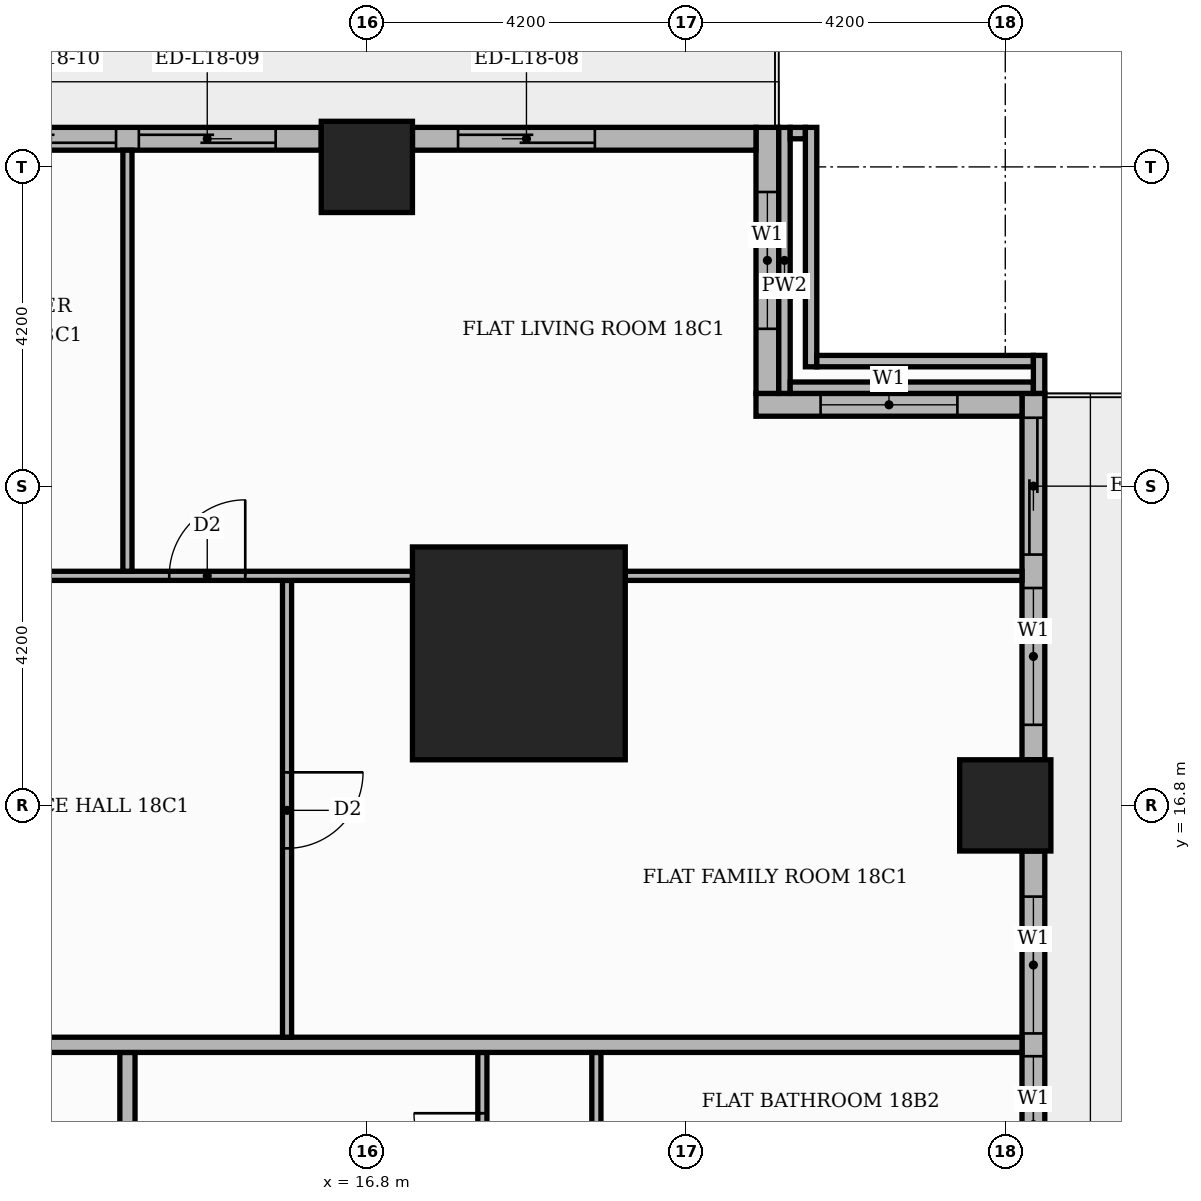
"""IFC4 building model, lengths in metres.
Left out: names, types, materials, properties, quantities, classifications, styles, units other than length and angle.
Written with IfcOpenShell. Run it as: python <this file> out.ifc"""

import sys

from ifc_helpers import new_model, si_unit, direction, frame, frame_2d, origin, origin_2d, place, context, subcontext, project, spatial, rectangle, extrude, element, fill, save


model = new_model("IFC4")
c1 = context("Model", 3, precision=1e-05, world=origin(), true_north=direction((0.0, 1.0)))
c2 = subcontext(c1, "Body", "Model", "MODEL_VIEW")
j1 = project(units=[si_unit("LENGTHUNIT", "METRE"), si_unit("PLANEANGLEUNIT", "RADIAN")], contexts=[c1])
p1 = place(None, origin())
s1 = spatial("IfcSite", under=j1, at=p1, CompositionType="ELEMENT")
p2 = place(p1, origin())
s2 = spatial("IfcBuilding", under=s1, at=p2, CompositionType="ELEMENT")
p3 = place(p2, frame((0.0, 0.0, 79.2)))
s3 = spatial("IfcBuildingStorey", under=s2, at=p3, CompositionType="ELEMENT", Elevation=79.2)
p4 = place(p3, frame((18.8, 18.8, 0.0), z_axis=(0.0, 0.0, 1.0), x_axis=(1.0, 0.0, 0.0)))
e1 = element("IfcColumn", 1, at=p4, inside=s3, PredefinedType="COLUMN", context=c2, shape_type="SweptSolid", body=[
    extrude(rectangle(XDim=2.8, YDim=2.8, at=origin_2d()), origin(), (0.0, 0.0, 1.0), 3.9),
])
for number, where, z_axis, x_axis in (
    (2, (25.2, 16.8, 0.0), (0.0, 0.0, 1.0), (1.0, 0.0, 0.0)),
    (3, (16.8, 25.2, 0.0), (0.0, 0.0, 1.0), (1.0, 0.0, 0.0)),
):
    element("IfcColumn", number, at=place(p3, frame(where, z_axis=z_axis, x_axis=x_axis)), inside=s3, PredefinedType="COLUMN", context=c2, shape_type="SweptSolid", body=[
        extrude(rectangle(XDim=1.2, YDim=1.2, at=origin_2d()), origin(), (0.0, 0.0, 1.0), 3.9),
    ])
p5 = place(p3, frame((25.57, 9.0, 0.0), z_axis=(0.0, 0.0, 1.0), x_axis=(0.0, 1.0, 0.0)))
e4 = element("IfcWall", 4, at=p5, inside=s3, PredefinedType="STANDARD", context=c2, shape_type="SweptSolid", body=[
    extrude(rectangle(XDim=7.2, YDim=0.3, at=frame_2d((3.6, 0.0))), origin(), (0.0, 0.0, 1.0), 3.48),
])
p6 = place(p5, frame((0.6, 0.0, 0.9)))
e5 = element("IfcOpeningElement", 5, at=p6, cuts=e4, PredefinedType="OPENING", context=c2, shape_type="SweptSolid", body=[
    extrude(rectangle(XDim=1.8, YDim=2.1, at=frame_2d((0.9, 1.05))), frame((0.0, 0.16, 0.0), z_axis=(0.0, -1.0, 0.0), x_axis=(1.0, 0.0, 0.0)), (0.0, 0.0, 1.0), 0.32),
])
p7 = place(p5, frame((2.7, 0.0, 0.9)))
e6 = element("IfcOpeningElement", 6, at=p7, cuts=e4, PredefinedType="OPENING", context=c2, shape_type="SweptSolid", body=[
    extrude(rectangle(XDim=1.8, YDim=2.1, at=frame_2d((0.9, 1.05))), frame((0.0, 0.16, 0.0), z_axis=(0.0, -1.0, 0.0), x_axis=(1.0, 0.0, 0.0)), (0.0, 0.0, 1.0), 0.32),
])
p8 = place(p5, frame((4.8, 0.0, 0.9)))
e7 = element("IfcOpeningElement", 7, at=p8, cuts=e4, PredefinedType="OPENING", context=c2, shape_type="SweptSolid", body=[
    extrude(rectangle(XDim=1.8, YDim=2.1, at=frame_2d((0.9, 1.05))), frame((0.0, 0.16, 0.0), z_axis=(0.0, -1.0, 0.0), x_axis=(1.0, 0.0, 0.0)), (0.0, 0.0, 1.0), 0.32),
])
p9 = place(p3, frame((25.57, 17.4, 0.0), z_axis=(0.0, 0.0, 1.0), x_axis=(0.0, 1.0, 0.0)))
e8 = element("IfcWall", 8, at=p9, inside=s3, PredefinedType="STANDARD", context=c2, shape_type="SweptSolid", body=[
    extrude(rectangle(XDim=4.82, YDim=0.3, at=frame_2d((2.41, 0.0))), origin(), (0.0, 0.0, 1.0), 3.48),
])
p10 = place(p9, frame((2.7, 0.0, 0.0)))
e9 = element("IfcOpeningElement", 9, at=p10, cuts=e8, PredefinedType="OPENING", context=c2, shape_type="SweptSolid", body=[
    extrude(rectangle(XDim=1.8, YDim=2.4, at=frame_2d((0.9, 1.2))), frame((0.0, 0.16, 0.0), z_axis=(0.0, -1.0, 0.0), x_axis=(1.0, 0.0, 0.0)), (0.0, 0.0, 1.0), 0.32),
])
p11 = place(p9, frame((0.46, 0.0, 0.9)))
e10 = element("IfcOpeningElement", 10, at=p11, cuts=e8, PredefinedType="OPENING", context=c2, shape_type="SweptSolid", body=[
    extrude(rectangle(XDim=1.8, YDim=2.1, at=frame_2d((0.9, 1.05))), frame((0.0, 0.16, 0.0), z_axis=(0.0, -1.0, 0.0), x_axis=(1.0, 0.0, 0.0)), (0.0, 0.0, 1.0), 0.32),
])
p12 = place(p3, frame((25.42, 22.07, 0.0), z_axis=(0.0, 0.0, 1.0), x_axis=(-1.0, 0.0, 0.0)))
e11 = element("IfcWall", 11, at=p12, inside=s3, PredefinedType="STANDARD", context=c2, shape_type="SweptSolid", body=[
    extrude(rectangle(XDim=3.5, YDim=0.3, at=frame_2d((1.75, 0.0))), origin(), (0.0, 0.0, 1.0), 3.48),
])
p13 = place(p12, frame((0.85, 0.0, 0.9)))
e12 = element("IfcOpeningElement", 12, at=p13, cuts=e11, PredefinedType="OPENING", context=c2, shape_type="SweptSolid", body=[
    extrude(rectangle(XDim=1.8, YDim=2.1, at=frame_2d((0.9, 1.05))), frame((0.0, 0.16, 0.0), z_axis=(0.0, -1.0, 0.0), x_axis=(1.0, 0.0, 0.0)), (0.0, 0.0, 1.0), 0.32),
])
p14 = place(p3, frame((22.07, 22.22, 0.0), z_axis=(0.0, 0.0, 1.0), x_axis=(0.0, 1.0, 0.0)))
e13 = element("IfcWall", 13, at=p14, inside=s3, PredefinedType="STANDARD", context=c2, shape_type="SweptSolid", body=[
    extrude(rectangle(XDim=3.5, YDim=0.3, at=frame_2d((1.75, 0.0))), origin(), (0.0, 0.0, 1.0), 3.48),
])
p15 = place(p14, frame((0.85, 0.0, 0.9)))
e14 = element("IfcOpeningElement", 14, at=p15, cuts=e13, PredefinedType="OPENING", context=c2, shape_type="SweptSolid", body=[
    extrude(rectangle(XDim=1.8, YDim=2.1, at=frame_2d((0.9, 1.05))), frame((0.0, 0.16, 0.0), z_axis=(0.0, -1.0, 0.0), x_axis=(1.0, 0.0, 0.0)), (0.0, 0.0, 1.0), 0.32),
])
p16 = place(p3, frame((21.92, 25.57, 0.0), z_axis=(0.0, 0.0, 1.0), x_axis=(-1.0, 0.0, 0.0)))
e15 = element("IfcWall", 15, at=p16, inside=s3, PredefinedType="STANDARD", context=c2, shape_type="SweptSolid", body=[
    extrude(rectangle(XDim=4.52, YDim=0.3, at=frame_2d((2.26, 0.0))), origin(), (0.0, 0.0, 1.0), 3.48),
])
p17 = place(p16, frame((2.12, 0.0, 0.0)))
e16 = element("IfcOpeningElement", 16, at=p17, cuts=e15, PredefinedType="OPENING", context=c2, shape_type="SweptSolid", body=[
    extrude(rectangle(XDim=1.8, YDim=2.4, at=frame_2d((0.9, 1.2))), frame((0.0, 0.16, 0.0), z_axis=(0.0, -1.0, 0.0), x_axis=(1.0, 0.0, 0.0)), (0.0, 0.0, 1.0), 0.32),
])
p18 = place(p3, frame((16.2, 25.57, 0.0), z_axis=(0.0, 0.0, 1.0), x_axis=(-1.0, 0.0, 0.0)))
e17 = element("IfcWall", 17, at=p18, inside=s3, PredefinedType="STANDARD", context=c2, shape_type="SweptSolid", body=[
    extrude(rectangle(XDim=7.2, YDim=0.3, at=frame_2d((3.6, 0.0))), origin(), (0.0, 0.0, 1.0), 3.48),
])
p19 = place(p18, frame((0.6, 0.0, 0.0)))
e18 = element("IfcOpeningElement", 18, at=p19, cuts=e17, PredefinedType="OPENING", context=c2, shape_type="SweptSolid", body=[
    extrude(rectangle(XDim=1.8, YDim=2.4, at=frame_2d((0.9, 1.2))), frame((0.0, 0.16, 0.0), z_axis=(0.0, -1.0, 0.0), x_axis=(1.0, 0.0, 0.0)), (0.0, 0.0, 1.0), 0.32),
])
p20 = place(p18, frame((2.7, 0.0, 0.0)))
e19 = element("IfcOpeningElement", 19, at=p20, cuts=e17, PredefinedType="OPENING", context=c2, shape_type="SweptSolid", body=[
    extrude(rectangle(XDim=1.8, YDim=2.4, at=frame_2d((0.9, 1.2))), frame((0.0, 0.16, 0.0), z_axis=(0.0, -1.0, 0.0), x_axis=(1.0, 0.0, 0.0)), (0.0, 0.0, 1.0), 0.32),
])
p21 = place(p18, frame((4.8, 0.0, 0.9)))
e20 = element("IfcOpeningElement", 20, at=p21, cuts=e17, PredefinedType="OPENING", context=c2, shape_type="SweptSolid", body=[
    extrude(rectangle(XDim=1.8, YDim=2.1, at=frame_2d((0.9, 1.05))), frame((0.0, 0.16, 0.0), z_axis=(0.0, -1.0, 0.0), x_axis=(1.0, 0.0, 0.0)), (0.0, 0.0, 1.0), 0.32),
])
p22 = place(p3, frame((22.295, 22.22, 0.0), z_axis=(0.0, 0.0, 1.0), x_axis=(0.0, 1.0, 0.0)))
e21 = element("IfcWall", 21, at=p22, inside=s3, PredefinedType="PARAPET", context=c2, shape_type="SweptSolid", body=[
    extrude(rectangle(XDim=3.5, YDim=0.15, at=frame_2d((1.75, 0.0))), origin(), (0.0, 0.0, 1.0), 1.1),
])
p23 = place(p3, frame((22.37, 25.645, 0.0), z_axis=(0.0, 0.0, 1.0), x_axis=(1.0, 0.0, 0.0)))
e22 = element("IfcWall", 22, at=p23, inside=s3, PredefinedType="PARAPET", context=c2, shape_type="SweptSolid", body=[
    extrude(rectangle(XDim=0.2, YDim=0.15, at=frame_2d((0.1, 0.0))), origin(), (0.0, 0.0, 1.0), 1.1),
])
p24 = place(p3, frame((22.37, 22.295, 0.0), z_axis=(0.0, 0.0, 1.0), x_axis=(1.0, 0.0, 0.0)))
e23 = element("IfcWall", 23, at=p24, inside=s3, PredefinedType="PARAPET", context=c2, shape_type="SweptSolid", body=[
    extrude(rectangle(XDim=3.2, YDim=0.15, at=frame_2d((1.6, 0.0))), origin(), (0.0, 0.0, 1.0), 1.1),
])
p25 = place(p3, frame((22.645, 22.57, 0.0), z_axis=(0.0, 0.0, 1.0), x_axis=(0.0, 1.0, 0.0)))
e24 = element("IfcWall", 24, at=p25, inside=s3, PredefinedType="PARAPET", context=c2, shape_type="SweptSolid", body=[
    extrude(rectangle(XDim=3.15, YDim=0.15, at=frame_2d((1.575, 0.0))), origin(), (0.0, 0.0, 1.0), 1.1),
])
p26 = place(p3, frame((22.72, 22.645, 0.0), z_axis=(0.0, 0.0, 1.0), x_axis=(1.0, 0.0, 0.0)))
e25 = element("IfcWall", 25, at=p26, inside=s3, PredefinedType="PARAPET", context=c2, shape_type="SweptSolid", body=[
    extrude(rectangle(XDim=2.85, YDim=0.15, at=frame_2d((1.425, 0.0))), origin(), (0.0, 0.0, 1.0), 1.1),
])
p27 = place(p3, frame((25.645, 22.22, 0.0), z_axis=(0.0, 0.0, 1.0), x_axis=(0.0, 1.0, 0.0)))
e26 = element("IfcWall", 26, at=p27, inside=s3, PredefinedType="PARAPET", context=c2, shape_type="SweptSolid", body=[
    extrude(rectangle(XDim=0.5, YDim=0.15, at=frame_2d((0.25, 0.0))), origin(), (0.0, 0.0, 1.0), 1.1),
])
p28 = place(p3, frame((13.65, -5.15, 0.0), z_axis=(0.0, 0.0, 1.0), x_axis=(0.0, 1.0, 0.0)))
e27 = element("IfcWall", 27, at=p28, inside=s3, PredefinedType="PARTITIONING", context=c2, shape_type="SweptSolid", body=[
    extrude(rectangle(XDim=18.7, YDim=0.2, at=frame_2d((9.35, 0.0))), origin(), (0.0, 0.0, 1.0), 3.48),
])
p29 = place(p28, frame((5.65, 0.0, 0.0)))
e28 = element("IfcOpeningElement", 28, at=p29, cuts=e27, PredefinedType="OPENING", context=c2, shape_type="SweptSolid", body=[
    extrude(rectangle(XDim=1.1, YDim=2.4, at=frame_2d((0.55, 1.2))), frame((0.0, 0.11, 0.0), z_axis=(0.0, -1.0, 0.0), x_axis=(1.0, 0.0, 0.0)), (0.0, 0.0, 1.0), 0.22),
])
p30 = place(p3, frame((18.32, 11.01, 0.0), z_axis=(0.0, 0.0, 1.0), x_axis=(0.0, 1.0, 0.0)))
e29 = element("IfcWall", 29, at=p30, inside=s3, PredefinedType="PARTITIONING", context=c2, shape_type="SweptSolid", body=[
    extrude(rectangle(XDim=2.54, YDim=0.12, at=frame_2d((1.27, 0.0))), origin(), (0.0, 0.0, 1.0), 3.48),
])
p31 = place(p30, frame((0.84, 0.0, 0.0)))
e30 = element("IfcOpeningElement", 30, at=p31, cuts=e29, PredefinedType="OPENING", context=c2, shape_type="SweptSolid", body=[
    extrude(rectangle(XDim=0.9, YDim=2.1, at=frame_2d((0.45, 1.05))), frame((0.0, 0.07, 0.0), z_axis=(0.0, -1.0, 0.0), x_axis=(1.0, 0.0, 0.0)), (0.0, 0.0, 1.0), 0.14),
])
p32 = place(p3, frame((19.82, 11.61, 0.0), z_axis=(0.0, 0.0, 1.0), x_axis=(0.0, 1.0, 0.0)))
e31 = element("IfcWall", 31, at=p32, inside=s3, PredefinedType="PARTITIONING", context=c2, shape_type="SweptSolid", body=[
    extrude(rectangle(XDim=1.94, YDim=0.12, at=frame_2d((0.97, 0.0))), origin(), (0.0, 0.0, 1.0), 3.48),
])
p33 = place(p3, frame((-13.65, 13.65, 0.0), z_axis=(0.0, 0.0, 1.0), x_axis=(1.0, 0.0, 0.0)))
e32 = element("IfcWall", 32, at=p33, inside=s3, PredefinedType="PARTITIONING", context=c2, shape_type="SweptSolid", body=[
    extrude(rectangle(XDim=39.07, YDim=0.2, at=frame_2d((19.535, 0.0))), origin(), (0.0, 0.0, 1.0), 3.48),
])
p34 = place(p33, frame((24.65, 0.0, 0.0)))
e33 = element("IfcOpeningElement", 33, at=p34, cuts=e32, PredefinedType="OPENING", context=c2, shape_type="SweptSolid", body=[
    extrude(rectangle(XDim=1.1, YDim=2.4, at=frame_2d((0.55, 1.2))), frame((0.0, 0.11, 0.0), z_axis=(0.0, -1.0, 0.0), x_axis=(1.0, 0.0, 0.0)), (0.0, 0.0, 1.0), 0.22),
])
p35 = place(p33, frame((14.15, 0.0, 0.0)))
e34 = element("IfcOpeningElement", 34, at=p35, cuts=e32, PredefinedType="OPENING", context=c2, shape_type="SweptSolid", body=[
    extrude(rectangle(XDim=1.1, YDim=2.4, at=frame_2d((0.55, 1.2))), frame((0.0, 0.11, 0.0), z_axis=(0.0, -1.0, 0.0), x_axis=(1.0, 0.0, 0.0)), (0.0, 0.0, 1.0), 0.22),
])
p36 = place(p3, frame((15.75, 13.75, 0.0), z_axis=(0.0, 0.0, 1.0), x_axis=(0.0, 1.0, 0.0)))
e35 = element("IfcWall", 35, at=p36, inside=s3, PredefinedType="PARTITIONING", context=c2, shape_type="SweptSolid", body=[
    extrude(rectangle(XDim=6.01, YDim=0.12, at=frame_2d((3.005, 0.0))), origin(), (0.0, 0.0, 1.0), 3.48),
])
p37 = place(p36, frame((2.485, 0.0, 0.0)))
e36 = element("IfcOpeningElement", 36, at=p37, cuts=e35, PredefinedType="OPENING", context=c2, shape_type="SweptSolid", body=[
    extrude(rectangle(XDim=1.0, YDim=2.1, at=frame_2d((0.5, 1.05))), frame((0.0, 0.07, 0.0), z_axis=(0.0, -1.0, 0.0), x_axis=(1.0, 0.0, 0.0)), (0.0, 0.0, 1.0), 0.14),
])
p38 = place(p3, frame((5.35, 19.82, 0.0), z_axis=(0.0, 0.0, 1.0), x_axis=(1.0, 0.0, 0.0)))
e37 = element("IfcWall", 37, at=p38, inside=s3, PredefinedType="PARTITIONING", context=c2, shape_type="SweptSolid", body=[
    extrude(rectangle(XDim=12.05, YDim=0.12, at=frame_2d((6.025, 0.0))), origin(), (0.0, 0.0, 1.0), 3.48),
])
p39 = place(p38, frame((8.85, 0.0, 0.0)))
e38 = element("IfcOpeningElement", 38, at=p39, cuts=e37, PredefinedType="OPENING", context=c2, shape_type="SweptSolid", body=[
    extrude(rectangle(XDim=1.0, YDim=2.1, at=frame_2d((0.5, 1.05))), frame((0.0, 0.07, 0.0), z_axis=(0.0, -1.0, 0.0), x_axis=(1.0, 0.0, 0.0)), (0.0, 0.0, 1.0), 0.14),
])
p40 = place(p38, frame((5.75, 0.0, 0.0)))
e39 = element("IfcOpeningElement", 39, at=p40, cuts=e37, PredefinedType="OPENING", context=c2, shape_type="SweptSolid", body=[
    extrude(rectangle(XDim=0.9, YDim=2.1, at=frame_2d((0.45, 1.05))), frame((0.0, 0.07, 0.0), z_axis=(0.0, -1.0, 0.0), x_axis=(1.0, 0.0, 0.0)), (0.0, 0.0, 1.0), 0.14),
])
p41 = place(p3, frame((20.2, 19.82, 0.0), z_axis=(0.0, 0.0, 1.0), x_axis=(1.0, 0.0, 0.0)))
e40 = element("IfcWall", 40, at=p41, inside=s3, PredefinedType="PARTITIONING", context=c2, shape_type="SweptSolid", body=[
    extrude(rectangle(XDim=5.22, YDim=0.12, at=frame_2d((2.61, 0.0))), origin(), (0.0, 0.0, 1.0), 3.48),
])
p42 = place(p3, frame((13.65, 19.88, 0.0), z_axis=(0.0, 0.0, 1.0), x_axis=(0.0, 1.0, 0.0)))
e41 = element("IfcWall", 41, at=p42, inside=s3, PredefinedType="PARTITIONING", context=c2, shape_type="SweptSolid", body=[
    extrude(rectangle(XDim=5.54, YDim=0.12, at=frame_2d((2.77, 0.0))), origin(), (0.0, 0.0, 1.0), 3.48),
])
p43 = place(p7, origin())
e42 = element("IfcWindow", 42, at=p43, inside=s3, PartitioningType="SINGLE_PANEL", PredefinedType="WINDOW", context=c2, shape_type="SweptSolid", body=[
    extrude(rectangle(XDim=1.8, YDim=2.1, at=frame_2d((0.9, 1.05))), frame((0.0, 0.03, 0.0), z_axis=(0.0, -1.0, 0.0), x_axis=(1.0, 0.0, 0.0)), (0.0, 0.0, 1.0), 0.06),
])
fill(e6, e42)
p44 = place(p8, origin())
e43 = element("IfcWindow", 43, at=p44, inside=s3, PartitioningType="SINGLE_PANEL", PredefinedType="WINDOW", context=c2, shape_type="SweptSolid", body=[
    extrude(rectangle(XDim=1.8, YDim=2.1, at=frame_2d((0.9, 1.05))), frame((0.0, 0.03, 0.0), z_axis=(0.0, -1.0, 0.0), x_axis=(1.0, 0.0, 0.0)), (0.0, 0.0, 1.0), 0.06),
])
fill(e7, e43)
p45 = place(p10, origin())
e44 = element("IfcDoor", 44, at=p45, inside=s3, OperationType="SLIDING_TO_LEFT", PredefinedType="DOOR", context=c2, shape_type="SweptSolid", body=[
    extrude(rectangle(XDim=1.8, YDim=2.4, at=frame_2d((0.9, 1.2))), frame((0.0, 0.025, 0.0), z_axis=(0.0, -1.0, 0.0), x_axis=(1.0, 0.0, 0.0)), (0.0, 0.0, 1.0), 0.05),
])
fill(e9, e44)
p46 = place(p11, origin())
e45 = element("IfcWindow", 45, at=p46, inside=s3, PartitioningType="SINGLE_PANEL", PredefinedType="WINDOW", context=c2, shape_type="SweptSolid", body=[
    extrude(rectangle(XDim=1.8, YDim=2.1, at=frame_2d((0.9, 1.05))), frame((0.0, 0.03, 0.0), z_axis=(0.0, -1.0, 0.0), x_axis=(1.0, 0.0, 0.0)), (0.0, 0.0, 1.0), 0.06),
])
fill(e10, e45)
p47 = place(p13, origin())
e46 = element("IfcWindow", 46, at=p47, inside=s3, PartitioningType="SINGLE_PANEL", PredefinedType="WINDOW", context=c2, shape_type="SweptSolid", body=[
    extrude(rectangle(XDim=1.8, YDim=2.1, at=frame_2d((0.9, 1.05))), frame((0.0, 0.03, 0.0), z_axis=(0.0, -1.0, 0.0), x_axis=(1.0, 0.0, 0.0)), (0.0, 0.0, 1.0), 0.06),
])
fill(e12, e46)
p48 = place(p15, origin())
e47 = element("IfcWindow", 47, at=p48, inside=s3, PartitioningType="SINGLE_PANEL", PredefinedType="WINDOW", context=c2, shape_type="SweptSolid", body=[
    extrude(rectangle(XDim=1.8, YDim=2.1, at=frame_2d((0.9, 1.05))), frame((0.0, 0.03, 0.0), z_axis=(0.0, -1.0, 0.0), x_axis=(1.0, 0.0, 0.0)), (0.0, 0.0, 1.0), 0.06),
])
fill(e14, e47)
p49 = place(p17, origin())
e48 = element("IfcDoor", 48, at=p49, inside=s3, OperationType="SLIDING_TO_RIGHT", PredefinedType="DOOR", context=c2, shape_type="SweptSolid", body=[
    extrude(rectangle(XDim=1.8, YDim=2.4, at=frame_2d((0.9, 1.2))), frame((0.0, 0.025, 0.0), z_axis=(0.0, -1.0, 0.0), x_axis=(1.0, 0.0, 0.0)), (0.0, 0.0, 1.0), 0.05),
])
fill(e16, e48)
p50 = place(p19, origin())
e49 = element("IfcDoor", 49, at=p50, inside=s3, OperationType="SLIDING_TO_LEFT", PredefinedType="DOOR", context=c2, shape_type="SweptSolid", body=[
    extrude(rectangle(XDim=1.8, YDim=2.4, at=frame_2d((0.9, 1.2))), frame((0.0, 0.025, 0.0), z_axis=(0.0, -1.0, 0.0), x_axis=(1.0, 0.0, 0.0)), (0.0, 0.0, 1.0), 0.05),
])
fill(e18, e49)
p51 = place(p20, origin())
e50 = element("IfcDoor", 50, at=p51, inside=s3, OperationType="SLIDING_TO_RIGHT", PredefinedType="DOOR", context=c2, shape_type="SweptSolid", body=[
    extrude(rectangle(XDim=1.8, YDim=2.4, at=frame_2d((0.9, 1.2))), frame((0.0, 0.025, 0.0), z_axis=(0.0, -1.0, 0.0), x_axis=(1.0, 0.0, 0.0)), (0.0, 0.0, 1.0), 0.05),
])
fill(e19, e50)
p52 = place(p31, origin())
e51 = element("IfcDoor", 51, at=p52, inside=s3, OperationType="SINGLE_SWING_RIGHT", PredefinedType="DOOR", context=c2, shape_type="SweptSolid", body=[
    extrude(rectangle(XDim=0.9, YDim=2.1, at=frame_2d((0.45, 1.05))), frame((0.0, 0.025, 0.0), z_axis=(0.0, -1.0, 0.0), x_axis=(1.0, 0.0, 0.0)), (0.0, 0.0, 1.0), 0.05),
])
fill(e30, e51)
p53 = place(p37, frame((1.0, 0.0, 0.0), z_axis=(0.0, 0.0, 1.0), x_axis=(-1.0, 0.0, 0.0)))
e52 = element("IfcDoor", 52, at=p53, inside=s3, OperationType="SINGLE_SWING_RIGHT", PredefinedType="DOOR", context=c2, shape_type="SweptSolid", body=[
    extrude(rectangle(XDim=1.0, YDim=2.1, at=frame_2d((0.5, 1.05))), frame((0.0, 0.025, 0.0), z_axis=(0.0, -1.0, 0.0), x_axis=(1.0, 0.0, 0.0)), (0.0, 0.0, 1.0), 0.05),
])
fill(e36, e52)
p54 = place(p39, origin())
e53 = element("IfcDoor", 53, at=p54, inside=s3, OperationType="SINGLE_SWING_RIGHT", PredefinedType="DOOR", context=c2, shape_type="SweptSolid", body=[
    extrude(rectangle(XDim=1.0, YDim=2.1, at=frame_2d((0.5, 1.05))), frame((0.0, 0.025, 0.0), z_axis=(0.0, -1.0, 0.0), x_axis=(1.0, 0.0, 0.0)), (0.0, 0.0, 1.0), 0.05),
])
fill(e38, e53)
save(model, sys.argv[1])
